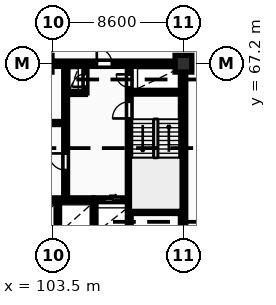
"""IFC4 building model, lengths in metres.
Left out: names, types, materials, properties, quantities, classifications, styles, units other than length and angle.
Written with IfcOpenShell. Run it as: python <this file> out.ifc"""

import sys

from ifc_helpers import new_model, si_unit, direction, frame, frame_2d, origin, origin_2d, place, context, subcontext, project, spatial, rectangle, extrude, element, fill, save


model = new_model("IFC4")
c1 = context("Model", 3, precision=1e-05, world=origin(), true_north=direction((0.0, 1.0)))
c2 = subcontext(c1, "Body", "Model", "MODEL_VIEW")
j1 = project(units=[si_unit("LENGTHUNIT", "METRE"), si_unit("PLANEANGLEUNIT", "RADIAN")], contexts=[c1])
p1 = place(None, origin())
s1 = spatial("IfcSite", under=j1, at=p1, CompositionType="ELEMENT")
p2 = place(p1, origin())
s2 = spatial("IfcBuilding", under=s1, at=p2, CompositionType="ELEMENT")
p3 = place(p2, frame((0.0, 0.0, -3.6)))
s3 = spatial("IfcBuildingStorey", under=s2, at=p3, CompositionType="ELEMENT", Elevation=-3.6)
p4 = place(p3, frame((112.1, 67.2, 0.0), z_axis=(0.0, 0.0, 1.0), x_axis=(1.0, 0.0, 0.0)))
e1 = element("IfcColumn", 1, at=p4, inside=s3, PredefinedType="COLUMN", context=c2, shape_type="SweptSolid", body=[
    extrude(rectangle(XDim=1.1, YDim=1.1, at=origin_2d()), origin(), (0.0, 0.0, 1.0), 3.6),
])
p5 = place(p3, frame((112.075, 55.375, 0.0), z_axis=(0.0, 0.0, 1.0), x_axis=(0.0, 1.0, 0.0)))
e2 = element("IfcWall", 2, at=p5, inside=s3, PredefinedType="SHEAR", context=c2, shape_type="SweptSolid", body=[
    extrude(rectangle(XDim=11.65, YDim=0.35, at=frame_2d((5.825, 0.0))), origin(), (0.0, 0.0, 1.0), 3.6),
])
p6 = place(p3, frame((75.95, 67.2, 0.0), z_axis=(0.0, 0.0, 1.0), x_axis=(1.0, 0.0, 0.0)))
e3 = element("IfcWall", 3, at=p6, inside=s3, PredefinedType="SHEAR", context=c2, shape_type="SweptSolid", body=[
    extrude(rectangle(XDim=36.3, YDim=0.35, at=frame_2d((18.15, 0.0))), origin(), (0.0, 0.0, 1.0), 3.6),
])
p7 = place(p6, frame((5.25, 0.0, 0.0)))
e4 = element("IfcOpeningElement", 4, at=p7, cuts=e3, PredefinedType="OPENING", context=c2, shape_type="SweptSolid", body=[
    extrude(rectangle(XDim=1.0, YDim=2.15, at=frame_2d((0.5, 1.075))), frame((0.0, 0.185, 0.0), z_axis=(0.0, -1.0, 0.0), x_axis=(1.0, 0.0, 0.0)), (0.0, 0.0, 1.0), 0.37),
])
p8 = place(p6, frame((21.6, 0.0, 0.0)))
e5 = element("IfcOpeningElement", 5, at=p8, cuts=e3, PredefinedType="OPENING", context=c2, shape_type="SweptSolid", body=[
    extrude(rectangle(XDim=1.5, YDim=2.2, at=frame_2d((0.75, 1.1))), frame((0.0, 0.185, 0.0), z_axis=(0.0, -1.0, 0.0), x_axis=(1.0, 0.0, 0.0)), (0.0, 0.0, 1.0), 0.37),
])
p9 = place(p6, frame((30.45, 0.0, 0.0)))
e6 = element("IfcOpeningElement", 6, at=p9, cuts=e3, PredefinedType="OPENING", context=c2, shape_type="SweptSolid", body=[
    extrude(rectangle(XDim=1.0, YDim=2.15, at=frame_2d((0.5, 1.075))), frame((0.0, 0.185, 0.0), z_axis=(0.0, -1.0, 0.0), x_axis=(1.0, 0.0, 0.0)), (0.0, 0.0, 1.0), 0.37),
])
p10 = place(p3, frame((103.85, 55.4, 0.0), z_axis=(0.0, 0.0, 1.0), x_axis=(0.0, 1.0, 0.0)))
e7 = element("IfcWall", 7, at=p10, inside=s3, PredefinedType="PARTITIONING", context=c2, shape_type="SweptSolid", body=[
    extrude(rectangle(XDim=2.72, YDim=0.2, at=frame_2d((1.36, 0.0))), origin(), (0.0, 0.0, 1.0), 3.3),
])
p11 = place(p3, frame((101.55, 58.25, 0.0), z_axis=(0.0, 0.0, 1.0), x_axis=(1.0, 0.0, 0.0)))
e8 = element("IfcWall", 8, at=p11, inside=s3, PredefinedType="SHEAR", context=c2, shape_type="SweptSolid", body=[
    extrude(rectangle(XDim=4.6, YDim=0.25, at=frame_2d((2.3, 0.0))), origin(), (0.0, 0.0, 1.0), 3.6),
])
p12 = place(p3, frame((106.22, 55.4, 0.0), z_axis=(0.0, 0.0, 1.0), x_axis=(0.0, 1.0, 0.0)))
e9 = element("IfcWall", 9, at=p12, inside=s3, PredefinedType="SHEAR", context=c2, shape_type="SweptSolid", body=[
    extrude(rectangle(XDim=2.85, YDim=0.25, at=frame_2d((1.425, 0.0))), origin(), (0.0, 0.0, 1.0), 3.6),
])
p13 = place(p3, frame((106.22, 58.25, 0.0), z_axis=(0.0, 0.0, 1.0), x_axis=(1.0, 0.0, 0.0)))
e10 = element("IfcWall", 10, at=p13, inside=s3, PredefinedType="SHEAR", context=c2, shape_type="SweptSolid", body=[
    extrude(rectangle(XDim=2.46, YDim=0.25, at=frame_2d((1.23, 0.0))), origin(), (0.0, 0.0, 1.0), 3.6),
])
p14 = place(p13, frame((0.67, 0.0, 0.0)))
e11 = element("IfcOpeningElement", 11, at=p14, cuts=e10, PredefinedType="OPENING", context=c2, shape_type="SweptSolid", body=[
    extrude(rectangle(XDim=1.12, YDim=2.12, at=frame_2d((0.56, 1.06))), frame((0.0, 0.135, 0.0), z_axis=(0.0, -1.0, 0.0), x_axis=(1.0, 0.0, 0.0)), (0.0, 0.0, 1.0), 0.27),
])
p15 = place(p3, frame((84.42, 63.3, 0.0), z_axis=(0.0, 0.0, 1.0), x_axis=(1.0, 0.0, 0.0)))
e12 = element("IfcWall", 12, at=p15, inside=s3, PredefinedType="PARTITIONING", context=c2, shape_type="SweptSolid", body=[
    extrude(rectangle(XDim=19.83, YDim=0.2, at=frame_2d((9.915, 0.0))), origin(), (0.0, 0.0, 1.0), 3.3),
])
p16 = place(p15, frame((1.15, 0.0, 0.0)))
e13 = element("IfcOpeningElement", 13, at=p16, cuts=e12, PredefinedType="OPENING", context=c2, shape_type="SweptSolid", body=[
    extrude(rectangle(XDim=0.85, YDim=2.05, at=frame_2d((0.425, 1.025))), frame((0.0, 0.11, 0.0), z_axis=(0.0, -1.0, 0.0), x_axis=(1.0, 0.0, 0.0)), (0.0, 0.0, 1.0), 0.22),
])
p17 = place(p15, frame((3.25, 0.0, 0.0)))
e14 = element("IfcOpeningElement", 14, at=p17, cuts=e12, PredefinedType="OPENING", context=c2, shape_type="SweptSolid", body=[
    extrude(rectangle(XDim=0.85, YDim=2.05, at=frame_2d((0.425, 1.025))), frame((0.0, 0.11, 0.0), z_axis=(0.0, -1.0, 0.0), x_axis=(1.0, 0.0, 0.0)), (0.0, 0.0, 1.0), 0.22),
])
p18 = place(p15, frame((13.08, 0.0, 0.0)))
e15 = element("IfcOpeningElement", 15, at=p18, cuts=e12, PredefinedType="OPENING", context=c2, shape_type="SweptSolid", body=[
    extrude(rectangle(XDim=1.5, YDim=2.2, at=frame_2d((0.75, 1.1))), frame((0.0, 0.11, 0.0), z_axis=(0.0, -1.0, 0.0), x_axis=(1.0, 0.0, 0.0)), (0.0, 0.0, 1.0), 0.22),
])
p19 = place(p15, frame((6.68, 0.0, 0.0)))
e16 = element("IfcOpeningElement", 16, at=p19, cuts=e12, PredefinedType="OPENING", context=c2, shape_type="SweptSolid", body=[
    extrude(rectangle(XDim=0.92, YDim=2.08, at=frame_2d((0.46, 1.04))), frame((0.0, 0.11, 0.0), z_axis=(0.0, -1.0, 0.0), x_axis=(1.0, 0.0, 0.0)), (0.0, 0.0, 1.0), 0.22),
])
p20 = place(p15, frame((16.33, 0.0, 0.0)))
e17 = element("IfcOpeningElement", 17, at=p20, cuts=e12, PredefinedType="OPENING", context=c2, shape_type="SweptSolid", body=[
    extrude(rectangle(XDim=0.88, YDim=2.06, at=frame_2d((0.44, 1.03))), frame((0.0, 0.11, 0.0), z_axis=(0.0, -1.0, 0.0), x_axis=(1.0, 0.0, 0.0)), (0.0, 0.0, 1.0), 0.22),
])
p21 = place(p3, frame((104.45, 65.28, 0.0), z_axis=(0.0, 0.0, 1.0), x_axis=(1.0, 0.0, 0.0)))
e18 = element("IfcWall", 18, at=p21, inside=s3, PredefinedType="PARTITIONING", context=c2, shape_type="SweptSolid", body=[
    extrude(rectangle(XDim=1.2, YDim=0.2, at=frame_2d((0.6, 0.0))), origin(), (0.0, 0.0, 1.0), 3.3),
])
p22 = place(p3, frame((105.65, 65.28, 0.0), z_axis=(0.0, 0.0, 1.0), x_axis=(0.0, 1.0, 0.0)))
e19 = element("IfcWall", 19, at=p22, inside=s3, PredefinedType="PARTITIONING", context=c2, shape_type="SweptSolid", body=[
    extrude(rectangle(XDim=1.72, YDim=0.2, at=frame_2d((0.86, 0.0))), origin(), (0.0, 0.0, 1.0), 3.3),
])
p23 = place(p22, frame((0.4, 0.0, 0.0)))
e20 = element("IfcOpeningElement", 20, at=p23, cuts=e19, PredefinedType="OPENING", context=c2, shape_type="SweptSolid", body=[
    extrude(rectangle(XDim=0.85, YDim=2.05, at=frame_2d((0.425, 1.025))), frame((0.0, 0.11, 0.0), z_axis=(0.0, -1.0, 0.0), x_axis=(1.0, 0.0, 0.0)), (0.0, 0.0, 1.0), 0.22),
])
p24 = place(p3, frame((104.35, 58.4, 0.0), z_axis=(0.0, 0.0, 1.0), x_axis=(0.0, 1.0, 0.0)))
e21 = element("IfcWall", 21, at=p24, inside=s3, PredefinedType="SHEAR", context=c2, shape_type="SweptSolid", body=[
    extrude(rectangle(XDim=8.6, YDim=0.25, at=frame_2d((4.3, 0.0))), origin(), (0.0, 0.0, 1.0), 3.6),
])
p25 = place(p24, frame((1.8, 0.0, 0.0)))
e22 = element("IfcOpeningElement", 22, at=p25, cuts=e21, PredefinedType="OPENING", context=c2, shape_type="SweptSolid", body=[
    extrude(rectangle(XDim=1.1, YDim=2.1, at=frame_2d((0.55, 1.05))), frame((0.0, 0.135, 0.0), z_axis=(0.0, -1.0, 0.0), x_axis=(1.0, 0.0, 0.0)), (0.0, 0.0, 1.0), 0.27),
])
p26 = place(p3, frame((108.535, 55.4, 0.0), z_axis=(0.0, 0.0, 1.0), x_axis=(0.0, 1.0, 0.0)))
e23 = element("IfcWall", 23, at=p26, inside=s3, PredefinedType="SHEAR", context=c2, shape_type="SweptSolid", body=[
    extrude(rectangle(XDim=11.6, YDim=0.25, at=frame_2d((5.8, 0.0))), origin(), (0.0, 0.0, 1.0), 3.6),
])
p27 = place(p26, frame((8.2, 0.0, 0.0)))
e24 = element("IfcOpeningElement", 24, at=p27, cuts=e23, PredefinedType="OPENING", context=c2, shape_type="SweptSolid", body=[
    extrude(rectangle(XDim=1.1, YDim=2.1, at=frame_2d((0.55, 1.05))), frame((0.0, 0.135, 0.0), z_axis=(0.0, -1.0, 0.0), x_axis=(1.0, 0.0, 0.0)), (0.0, 0.0, 1.0), 0.27),
])
p28 = place(p26, frame((10.25, 0.0, 0.0)))
e25 = element("IfcOpeningElement", 25, at=p28, cuts=e23, PredefinedType="OPENING", context=c2, shape_type="SweptSolid", body=[
    extrude(rectangle(XDim=0.85, YDim=2.05, at=frame_2d((0.425, 1.025))), frame((0.0, 0.135, 0.0), z_axis=(0.0, -1.0, 0.0), x_axis=(1.0, 0.0, 0.0)), (0.0, 0.0, 1.0), 0.27),
])
for number, where, z_axis, x_axis in (
    (26, (108.66, 57.475, 0.0), (0.0, 0.0, 1.0), (1.0, 0.0, 0.0)),
    (27, (108.66, 65.325, 0.0), (0.0, 0.0, 1.0), (1.0, 0.0, 0.0)),
):
    element("IfcWall", number, at=place(p3, frame(where, z_axis=z_axis, x_axis=x_axis)), inside=s3, PredefinedType="SHEAR", context=c2, shape_type="SweptSolid", body=[
        extrude(rectangle(XDim=3.24, YDim=0.25, at=frame_2d((1.62, 0.0))), origin(), (0.0, 0.0, 1.0), 3.6),
    ])
p29 = place(p9, origin())
e28 = element("IfcDoor", 28, at=p29, inside=s3, OperationType="SINGLE_SWING_LEFT", PredefinedType="DOOR", context=c2, shape_type="SweptSolid", body=[
    extrude(rectangle(XDim=1.0, YDim=2.15, at=frame_2d((0.5, 1.075))), frame((0.0, 0.025, 0.0), z_axis=(0.0, -1.0, 0.0), x_axis=(1.0, 0.0, 0.0)), (0.0, 0.0, 1.0), 0.05),
])
fill(e6, e28)
p30 = place(p14, origin())
e29 = element("IfcDoor", 29, at=p30, inside=s3, OperationType="SLIDING_TO_RIGHT", PredefinedType="DOOR", context=c2, shape_type="SweptSolid", body=[
    extrude(rectangle(XDim=1.12, YDim=2.12, at=frame_2d((0.56, 1.06))), frame((0.0, 0.025, 0.0), z_axis=(0.0, -1.0, 0.0), x_axis=(1.0, 0.0, 0.0)), (0.0, 0.0, 1.0), 0.05),
])
fill(e11, e29)
p31 = place(p23, origin())
e30 = element("IfcDoor", 30, at=p31, inside=s3, OperationType="SINGLE_SWING_LEFT", PredefinedType="DOOR", context=c2, shape_type="SweptSolid", body=[
    extrude(rectangle(XDim=0.85, YDim=2.05, at=frame_2d((0.425, 1.025))), frame((0.0, 0.025, 0.0), z_axis=(0.0, -1.0, 0.0), x_axis=(1.0, 0.0, 0.0)), (0.0, 0.0, 1.0), 0.05),
])
fill(e20, e30)
p32 = place(p25, origin())
e31 = element("IfcDoor", 31, at=p32, inside=s3, OperationType="SINGLE_SWING_RIGHT", PredefinedType="DOOR", context=c2, shape_type="SweptSolid", body=[
    extrude(rectangle(XDim=1.1, YDim=2.1, at=frame_2d((0.55, 1.05))), frame((0.0, 0.025, 0.0), z_axis=(0.0, -1.0, 0.0), x_axis=(1.0, 0.0, 0.0)), (0.0, 0.0, 1.0), 0.05),
])
fill(e22, e31)
p33 = place(p27, origin())
e32 = element("IfcDoor", 32, at=p33, inside=s3, OperationType="SINGLE_SWING_LEFT", PredefinedType="DOOR", context=c2, shape_type="SweptSolid", body=[
    extrude(rectangle(XDim=1.1, YDim=2.1, at=frame_2d((0.55, 1.05))), frame((0.0, 0.025, 0.0), z_axis=(0.0, -1.0, 0.0), x_axis=(1.0, 0.0, 0.0)), (0.0, 0.0, 1.0), 0.05),
])
fill(e24, e32)
p34 = place(p28, origin())
e33 = element("IfcDoor", 33, at=p34, inside=s3, OperationType="SINGLE_SWING_RIGHT", PredefinedType="DOOR", context=c2, shape_type="SweptSolid", body=[
    extrude(rectangle(XDim=0.85, YDim=2.05, at=frame_2d((0.425, 1.025))), frame((0.0, 0.025, 0.0), z_axis=(0.0, -1.0, 0.0), x_axis=(1.0, 0.0, 0.0)), (0.0, 0.0, 1.0), 0.05),
])
fill(e25, e33)
save(model, sys.argv[1])
